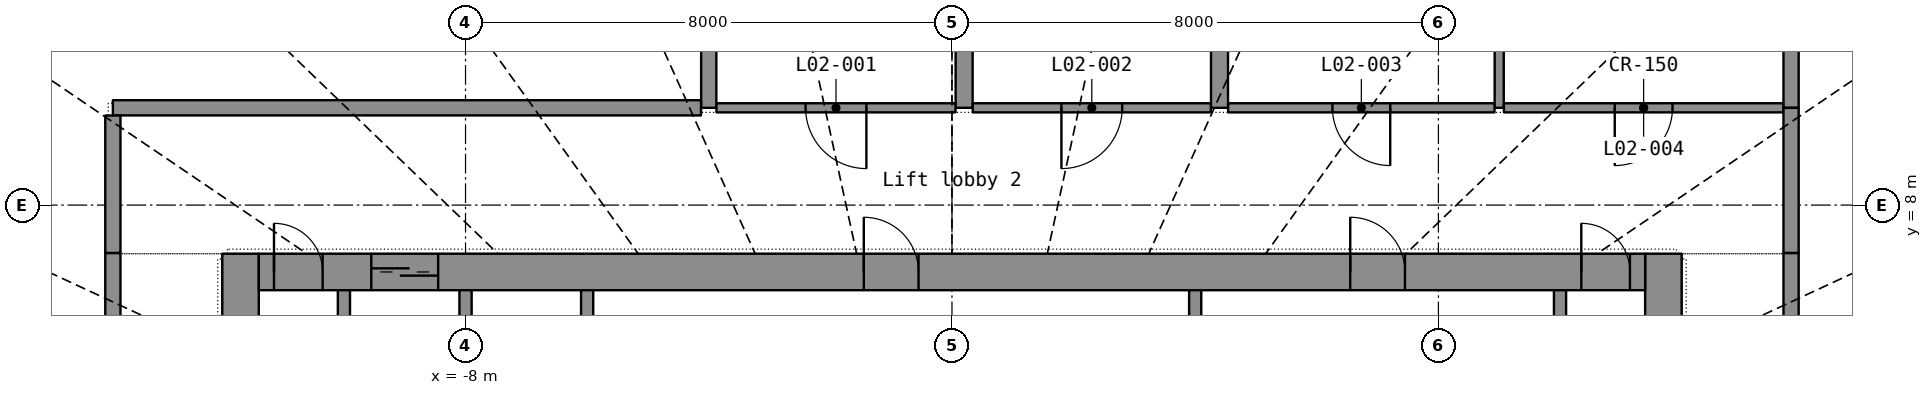
"""IFC4 building model, lengths in metres.
Left out: names, types, materials, properties, quantities, classifications, styles, units other than length and angle.
Written with IfcOpenShell. Run it as: python <this file> out.ifc"""

import sys

from ifc_helpers import new_model, si_unit, direction, frame, frame_2d, origin, place, context, subcontext, project, spatial, rectangle, extrude, element, fill, save


model = new_model("IFC4")
c1 = context("Model", 3, precision=1e-05, world=origin(), true_north=direction((0.0, 1.0)))
c2 = subcontext(c1, "Body", "Model", "MODEL_VIEW")
j1 = project(units=[si_unit("LENGTHUNIT", "METRE"), si_unit("PLANEANGLEUNIT", "RADIAN")], contexts=[c1])
p1 = place(None, origin())
s1 = spatial("IfcSite", under=j1, at=p1, CompositionType="ELEMENT")
p2 = place(p1, origin())
s2 = spatial("IfcBuilding", under=s1, at=p2, CompositionType="ELEMENT")
p3 = place(p2, frame((0.0, 0.0, 13.5)))
s3 = spatial("IfcBuildingStorey", under=s2, at=p3, CompositionType="ELEMENT", Elevation=13.5)
p4 = place(p3, frame((-11.7, -7.2, 0.0), z_axis=(0.0, 0.0, 1.0), x_axis=(0.0, 1.0, 0.0)))
e1 = element("IfcWall", 1, at=p4, inside=s3, PredefinedType="SHEAR", context=c2, shape_type="SweptSolid", body=[
    extrude(rectangle(XDim=14.4, YDim=0.6, at=frame_2d((7.2, 0.0))), origin(), (0.0, 0.0, 1.0), 6.1),
])
p5 = place(p4, frame((6.5, 0.0, 0.0)))
e2 = element("IfcOpeningElement", 2, at=p5, cuts=e1, PredefinedType="OPENING", context=c2, shape_type="SweptSolid", body=[
    extrude(rectangle(XDim=1.4, YDim=2.2, at=frame_2d((0.7, 1.1))), frame((0.0, 0.31, 0.0), z_axis=(0.0, -1.0, 0.0), x_axis=(1.0, 0.0, 0.0)), (0.0, 0.0, 1.0), 0.62),
])
p6 = place(p3, frame((11.7, -7.2, 0.0), z_axis=(0.0, 0.0, 1.0), x_axis=(0.0, 1.0, 0.0)))
e3 = element("IfcWall", 3, at=p6, inside=s3, PredefinedType="SHEAR", context=c2, shape_type="SweptSolid", body=[
    extrude(rectangle(XDim=14.4, YDim=0.6, at=frame_2d((7.2, 0.0))), origin(), (0.0, 0.0, 1.0), 6.1),
])
p7 = place(p6, frame((6.5, 0.0, 0.0)))
e4 = element("IfcOpeningElement", 4, at=p7, cuts=e3, PredefinedType="OPENING", context=c2, shape_type="SweptSolid", body=[
    extrude(rectangle(XDim=1.4, YDim=2.2, at=frame_2d((0.7, 1.1))), frame((0.0, 0.31, 0.0), z_axis=(0.0, -1.0, 0.0), x_axis=(1.0, 0.0, 0.0)), (0.0, 0.0, 1.0), 0.62),
])
p8 = place(p3, frame((-11.4, 6.9, 0.0), z_axis=(0.0, 0.0, 1.0), x_axis=(1.0, 0.0, 0.0)))
e5 = element("IfcWall", 5, at=p8, inside=s3, PredefinedType="SHEAR", context=c2, shape_type="SweptSolid", body=[
    extrude(rectangle(XDim=22.8, YDim=0.6, at=frame_2d((11.4, 0.0))), origin(), (0.0, 0.0, 1.0), 6.1),
])
p9 = place(p8, frame((1.85, 0.0, 0.0)))
e6 = element("IfcOpeningElement", 6, at=p9, cuts=e5, PredefinedType="OPENING", context=c2, shape_type="SweptSolid", body=[
    extrude(rectangle(XDim=1.1, YDim=2.2, at=frame_2d((0.55, 1.1))), frame((0.0, 0.31, 0.0), z_axis=(0.0, -1.0, 0.0), x_axis=(1.0, 0.0, 0.0)), (0.0, 0.0, 1.0), 0.62),
])
p10 = place(p8, frame((9.95, 0.0, 0.0)))
e7 = element("IfcOpeningElement", 7, at=p10, cuts=e5, PredefinedType="OPENING", context=c2, shape_type="SweptSolid", body=[
    extrude(rectangle(XDim=0.9, YDim=2.1, at=frame_2d((0.45, 1.05))), frame((0.0, 0.31, 0.0), z_axis=(0.0, -1.0, 0.0), x_axis=(1.0, 0.0, 0.0)), (0.0, 0.0, 1.0), 0.62),
])
p11 = place(p8, frame((17.95, 0.0, 0.0)))
e8 = element("IfcOpeningElement", 8, at=p11, cuts=e5, PredefinedType="OPENING", context=c2, shape_type="SweptSolid", body=[
    extrude(rectangle(XDim=0.9, YDim=2.1, at=frame_2d((0.45, 1.05))), frame((0.0, 0.31, 0.0), z_axis=(0.0, -1.0, 0.0), x_axis=(1.0, 0.0, 0.0)), (0.0, 0.0, 1.0), 0.62),
])
p12 = place(p8, frame((0.25, 0.0, 0.0)))
e9 = element("IfcOpeningElement", 9, at=p12, cuts=e5, PredefinedType="OPENING", context=c2, shape_type="SweptSolid", body=[
    extrude(rectangle(XDim=0.8, YDim=2.05, at=frame_2d((0.4, 1.025))), frame((0.0, 0.31, 0.0), z_axis=(0.0, -1.0, 0.0), x_axis=(1.0, 0.0, 0.0)), (0.0, 0.0, 1.0), 0.62),
])
p13 = place(p8, frame((21.75, 0.0, 0.0)))
e10 = element("IfcOpeningElement", 10, at=p13, cuts=e5, PredefinedType="OPENING", context=c2, shape_type="SweptSolid", body=[
    extrude(rectangle(XDim=0.8, YDim=2.05, at=frame_2d((0.4, 1.025))), frame((0.0, 0.31, 0.0), z_axis=(0.0, -1.0, 0.0), x_axis=(1.0, 0.0, 0.0)), (0.0, 0.0, 1.0), 0.62),
])
for number, where, z_axis, x_axis in (
    (11, (-10.0, 3.9, 0.0), (0.0, 0.0, 1.0), (0.0, 1.0, 0.0)),
    (12, (-8.0, 3.9, 0.0), (0.0, 0.0, 1.0), (0.0, 1.0, 0.0)),
    (13, (-6.0, 3.9, 0.0), (0.0, 0.0, 1.0), (0.0, 1.0, 0.0)),
    (14, (10.0, 3.9, 0.0), (0.0, 0.0, 1.0), (0.0, 1.0, 0.0)),
):
    element("IfcWall", number, at=place(p3, frame(where, z_axis=z_axis, x_axis=x_axis)), inside=s3, PredefinedType="SHEAR", context=c2, shape_type="SweptSolid", body=[
        extrude(rectangle(XDim=2.7, YDim=0.2, at=frame_2d((1.35, 0.0))), origin(), (0.0, 0.0, 1.0), 6.1),
    ])
p14 = place(p3, frame((4.0, 3.9, 0.0), z_axis=(0.0, 0.0, 1.0), x_axis=(0.0, 1.0, 0.0)))
e15 = element("IfcWall", 15, at=p14, inside=s3, PredefinedType="PARTITIONING", context=c2, shape_type="SweptSolid", body=[
    extrude(rectangle(XDim=2.7, YDim=0.2, at=frame_2d((1.35, 0.0))), origin(), (0.0, 0.0, 1.0), 6.1),
])
p15 = place(p3, frame((0.2, 9.6, 0.0), z_axis=(0.0, 0.0, 1.0), x_axis=(0.0, 1.0, 0.0)))
e16 = element("IfcWall", 16, at=p15, inside=s3, PredefinedType="PARTITIONING", context=c2, shape_type="SweptSolid", body=[
    extrude(rectangle(XDim=14.194, YDim=0.28, at=frame_2d((7.097, 0.0))), origin(), (0.0, 0.0, 1.0), 5.1),
])
p16 = place(p15, frame((5.897, 0.0, 1.0)))
e17 = element("IfcOpeningElement", 17, at=p16, cuts=e16, PredefinedType="OPENING", context=c2, shape_type="SweptSolid", body=[
    extrude(rectangle(XDim=2.4, YDim=1.2, at=frame_2d((1.2, 0.6))), frame((0.0, 0.15, 0.0), z_axis=(0.0, -1.0, 0.0), x_axis=(1.0, 0.0, 0.0)), (0.0, 0.0, 1.0), 0.3),
])
p17 = place(p3, frame((-4.0, 9.6, 0.0), z_axis=(0.0, 0.0, 1.0), x_axis=(0.0, 1.0, 0.0)))
e18 = element("IfcWall", 18, at=p17, inside=s3, PredefinedType="PARTITIONING", context=c2, shape_type="SweptSolid", body=[
    extrude(rectangle(XDim=13.846, YDim=0.25, at=frame_2d((6.923, 0.0))), origin(), (0.0, 0.0, 1.0), 5.1),
])
p18 = place(p17, frame((5.723, 0.0, 1.0)))
e19 = element("IfcOpeningElement", 19, at=p18, cuts=e18, PredefinedType="OPENING", context=c2, shape_type="SweptSolid", body=[
    extrude(rectangle(XDim=2.4, YDim=1.2, at=frame_2d((1.2, 0.6))), frame((0.0, 0.135, 0.0), z_axis=(0.0, -1.0, 0.0), x_axis=(1.0, 0.0, 0.0)), (0.0, 0.0, 1.0), 0.27),
])
p19 = place(p3, frame((4.4, 9.6, 0.0), z_axis=(0.0, 0.0, 1.0), x_axis=(0.0, 1.0, 0.0)))
e20 = element("IfcWall", 20, at=p19, inside=s3, PredefinedType="PARTITIONING", context=c2, shape_type="SweptSolid", body=[
    extrude(rectangle(XDim=13.803, YDim=0.28, at=frame_2d((6.902, 0.0))), origin(), (0.0, 0.0, 1.0), 5.1),
])
p20 = place(p19, frame((5.702, 0.0, 1.0)))
e21 = element("IfcOpeningElement", 21, at=p20, cuts=e20, PredefinedType="OPENING", context=c2, shape_type="SweptSolid", body=[
    extrude(rectangle(XDim=2.4, YDim=1.2, at=frame_2d((1.2, 0.6))), frame((0.0, 0.15, 0.0), z_axis=(0.0, -1.0, 0.0), x_axis=(1.0, 0.0, 0.0)), (0.0, 0.0, 1.0), 0.3),
])
p21 = place(p3, frame((9.0, 9.6, 0.0), z_axis=(0.0, 0.0, 1.0), x_axis=(0.0, 1.0, 0.0)))
e22 = element("IfcWall", 22, at=p21, inside=s3, PredefinedType="PARTITIONING", context=c2, shape_type="SweptSolid", body=[
    extrude(rectangle(XDim=12.906, YDim=0.15, at=frame_2d((6.453, 0.0))), origin(), (0.0, 0.0, 1.0), 5.1),
])
p22 = place(p3, frame((13.8, 20.878, 0.0), z_axis=(0.0, 0.0, 1.0), x_axis=(0.0, -1.0, 0.0)))
e23 = element("IfcWall", 23, at=p22, inside=s3, PredefinedType="PARTITIONING", context=c2, shape_type="SweptSolid", body=[
    extrude(rectangle(XDim=11.278, YDim=0.25, at=frame_2d((5.639, 0.0))), origin(), (0.0, 0.0, 1.0), 5.1),
])
p23 = place(p3, frame((-4.127, 9.6, 0.0), z_axis=(0.0, 0.0, 1.0), x_axis=(-1.0, 0.0, 0.0)))
e24 = element("IfcWall", 24, at=p23, inside=s3, PredefinedType="PARTITIONING", context=c2, shape_type="SweptSolid", body=[
    extrude(rectangle(XDim=9.673, YDim=0.25, at=frame_2d((4.836, 0.0))), origin(), (0.0, 0.0, 1.0), 5.1),
])
p24 = place(p3, frame((13.673, 9.6, 0.0), z_axis=(0.0, 0.0, 1.0), x_axis=(-1.0, 0.0, 0.0)))
e25 = element("IfcWall", 25, at=p24, inside=s3, PredefinedType="PARTITIONING", context=c2, shape_type="SweptSolid", body=[
    extrude(rectangle(XDim=4.596, YDim=0.15, at=frame_2d((2.298, 0.0))), origin(), (0.0, 0.0, 1.0), 5.1),
])
p25 = place(p24, frame((1.823, 0.0, 0.0)))
e26 = element("IfcOpeningElement", 26, at=p25, cuts=e25, PredefinedType="OPENING", context=c2, shape_type="SweptSolid", body=[
    extrude(rectangle(XDim=0.95, YDim=2.15, at=frame_2d((0.475, 1.075))), frame((0.0, 0.085, 0.0), z_axis=(0.0, -1.0, 0.0), x_axis=(1.0, 0.0, 0.0)), (0.0, 0.0, 1.0), 0.17),
])
p26 = place(p3, frame((8.923, 9.6, 0.0), z_axis=(0.0, 0.0, 1.0), x_axis=(-1.0, 0.0, 0.0)))
e27 = element("IfcWall", 27, at=p26, inside=s3, PredefinedType="PARTITIONING", context=c2, shape_type="SweptSolid", body=[
    extrude(rectangle(XDim=4.381, YDim=0.15, at=frame_2d((2.19, 0.0))), origin(), (0.0, 0.0, 1.0), 5.1),
])
p27 = place(p26, frame((1.716, 0.0, 0.0)))
e28 = element("IfcOpeningElement", 28, at=p27, cuts=e27, PredefinedType="OPENING", context=c2, shape_type="SweptSolid", body=[
    extrude(rectangle(XDim=0.95, YDim=2.15, at=frame_2d((0.475, 1.075))), frame((0.0, 0.085, 0.0), z_axis=(0.0, -1.0, 0.0), x_axis=(1.0, 0.0, 0.0)), (0.0, 0.0, 1.0), 0.17),
])
for number, where, z_axis, x_axis in (
    (29, (-13.8, 7.212, 0.0), (0.0, 0.0, 1.0), (0.0, -1.0, 0.0)),
    (30, (13.8, 3.0, 0.0), (0.0, 0.0, 1.0), (0.0, 1.0, 0.0)),
):
    element("IfcWall", number, at=place(p3, frame(where, z_axis=z_axis, x_axis=x_axis)), inside=s3, PredefinedType="PARTITIONING", context=c2, shape_type="SweptSolid", body=[
        extrude(rectangle(XDim=4.212, YDim=0.25, at=frame_2d((2.106, 0.0))), origin(), (0.0, 0.0, 1.0), 5.1),
    ])
p28 = place(p3, frame((0.058, 9.6, 0.0), z_axis=(0.0, 0.0, 1.0), x_axis=(-1.0, 0.0, 0.0)))
e31 = element("IfcWall", 31, at=p28, inside=s3, PredefinedType="PARTITIONING", context=c2, shape_type="SweptSolid", body=[
    extrude(rectangle(XDim=3.931, YDim=0.15, at=frame_2d((1.966, 0.0))), origin(), (0.0, 0.0, 1.0), 5.1),
])
p29 = place(p28, frame((1.466, 0.0, 0.0)))
e32 = element("IfcOpeningElement", 32, at=p29, cuts=e31, PredefinedType="OPENING", context=c2, shape_type="SweptSolid", body=[
    extrude(rectangle(XDim=1.0, YDim=2.2, at=frame_2d((0.5, 1.1))), frame((0.0, 0.085, 0.0), z_axis=(0.0, -1.0, 0.0), x_axis=(1.0, 0.0, 0.0)), (0.0, 0.0, 1.0), 0.17),
])
p30 = place(p3, frame((4.258, 9.6, 0.0), z_axis=(0.0, 0.0, 1.0), x_axis=(-1.0, 0.0, 0.0)))
e33 = element("IfcWall", 33, at=p30, inside=s3, PredefinedType="PARTITIONING", context=c2, shape_type="SweptSolid", body=[
    extrude(rectangle(XDim=3.916, YDim=0.15, at=frame_2d((1.958, 0.0))), origin(), (0.0, 0.0, 1.0), 5.1),
])
p31 = place(p30, frame((1.458, 0.0, 0.0)))
e34 = element("IfcOpeningElement", 34, at=p31, cuts=e33, PredefinedType="OPENING", context=c2, shape_type="SweptSolid", body=[
    extrude(rectangle(XDim=1.0, YDim=2.2, at=frame_2d((0.5, 1.1))), frame((0.0, 0.085, 0.0), z_axis=(0.0, -1.0, 0.0), x_axis=(1.0, 0.0, 0.0)), (0.0, 0.0, 1.0), 0.17),
])
p32 = place(p3, frame((13.8, 7.213, 0.0), z_axis=(0.0, 0.0, 1.0), x_axis=(0.0, 1.0, 0.0)))
e35 = element("IfcWall", 35, at=p32, inside=s3, PredefinedType="PARTITIONING", context=c2, shape_type="SweptSolid", body=[
    extrude(rectangle(XDim=2.386, YDim=0.25, at=frame_2d((1.193, 0.0))), origin(), (0.0, 0.0, 1.0), 5.1),
])
p33 = place(p3, frame((-13.8, 9.473, 0.0), z_axis=(0.0, 0.0, 1.0), x_axis=(0.0, -1.0, 0.0)))
e36 = element("IfcWall", 36, at=p33, inside=s3, PredefinedType="PARTITIONING", context=c2, shape_type="SweptSolid", body=[
    extrude(rectangle(XDim=2.26, YDim=0.25, at=frame_2d((1.13, 0.0))), origin(), (0.0, 0.0, 1.0), 5.1),
])
p34 = place(p9, origin())
e37 = element("IfcDoor", 37, at=p34, inside=s3, OperationType="DOUBLE_DOOR_SLIDING", PredefinedType="DOOR", context=c2, shape_type="SweptSolid", body=[
    extrude(rectangle(XDim=1.1, YDim=2.2, at=frame_2d((0.55, 1.1))), frame((0.0, 0.025, 0.0), z_axis=(0.0, -1.0, 0.0), x_axis=(1.0, 0.0, 0.0)), (0.0, 0.0, 1.0), 0.05),
])
fill(e6, e37)
p35 = place(p10, origin())
e38 = element("IfcDoor", 38, at=p35, inside=s3, OperationType="SINGLE_SWING_LEFT", PredefinedType="DOOR", context=c2, shape_type="SweptSolid", body=[
    extrude(rectangle(XDim=0.9, YDim=2.1, at=frame_2d((0.45, 1.05))), frame((0.0, 0.025, 0.0), z_axis=(0.0, -1.0, 0.0), x_axis=(1.0, 0.0, 0.0)), (0.0, 0.0, 1.0), 0.05),
])
fill(e7, e38)
p36 = place(p11, origin())
e39 = element("IfcDoor", 39, at=p36, inside=s3, OperationType="SINGLE_SWING_LEFT", PredefinedType="DOOR", context=c2, shape_type="SweptSolid", body=[
    extrude(rectangle(XDim=0.9, YDim=2.1, at=frame_2d((0.45, 1.05))), frame((0.0, 0.025, 0.0), z_axis=(0.0, -1.0, 0.0), x_axis=(1.0, 0.0, 0.0)), (0.0, 0.0, 1.0), 0.05),
])
fill(e8, e39)
p37 = place(p12, origin())
e40 = element("IfcDoor", 40, at=p37, inside=s3, OperationType="SINGLE_SWING_LEFT", PredefinedType="DOOR", context=c2, shape_type="SweptSolid", body=[
    extrude(rectangle(XDim=0.8, YDim=2.05, at=frame_2d((0.4, 1.025))), frame((0.0, 0.025, 0.0), z_axis=(0.0, -1.0, 0.0), x_axis=(1.0, 0.0, 0.0)), (0.0, 0.0, 1.0), 0.05),
])
fill(e9, e40)
p38 = place(p13, origin())
e41 = element("IfcDoor", 41, at=p38, inside=s3, OperationType="SINGLE_SWING_LEFT", PredefinedType="DOOR", context=c2, shape_type="SweptSolid", body=[
    extrude(rectangle(XDim=0.8, YDim=2.05, at=frame_2d((0.4, 1.025))), frame((0.0, 0.025, 0.0), z_axis=(0.0, -1.0, 0.0), x_axis=(1.0, 0.0, 0.0)), (0.0, 0.0, 1.0), 0.05),
])
fill(e10, e41)
p39 = place(p29, origin())
e42 = element("IfcDoor", 42, at=p39, inside=s3, OperationType="SINGLE_SWING_LEFT", PredefinedType="DOOR", context=c2, shape_type="SweptSolid", body=[
    extrude(rectangle(XDim=1.0, YDim=2.2, at=frame_2d((0.5, 1.1))), frame((0.0, 0.025, 0.0), z_axis=(0.0, -1.0, 0.0), x_axis=(1.0, 0.0, 0.0)), (0.0, 0.0, 1.0), 0.05),
])
fill(e32, e42)
p40 = place(p31, origin())
e43 = element("IfcDoor", 43, at=p40, inside=s3, OperationType="SINGLE_SWING_RIGHT", PredefinedType="DOOR", context=c2, shape_type="SweptSolid", body=[
    extrude(rectangle(XDim=1.0, YDim=2.2, at=frame_2d((0.5, 1.1))), frame((0.0, 0.025, 0.0), z_axis=(0.0, -1.0, 0.0), x_axis=(1.0, 0.0, 0.0)), (0.0, 0.0, 1.0), 0.05),
])
fill(e34, e43)
p41 = place(p27, origin())
e44 = element("IfcDoor", 44, at=p41, inside=s3, OperationType="SINGLE_SWING_LEFT", PredefinedType="DOOR", context=c2, shape_type="SweptSolid", body=[
    extrude(rectangle(XDim=0.95, YDim=2.15, at=frame_2d((0.475, 1.075))), frame((0.0, 0.025, 0.0), z_axis=(0.0, -1.0, 0.0), x_axis=(1.0, 0.0, 0.0)), (0.0, 0.0, 1.0), 0.05),
])
fill(e28, e44)
p42 = place(p25, origin())
e45 = element("IfcDoor", 45, at=p42, inside=s3, OperationType="SINGLE_SWING_RIGHT", PredefinedType="DOOR", context=c2, shape_type="SweptSolid", body=[
    extrude(rectangle(XDim=0.95, YDim=2.15, at=frame_2d((0.475, 1.075))), frame((0.0, 0.025, 0.0), z_axis=(0.0, -1.0, 0.0), x_axis=(1.0, 0.0, 0.0)), (0.0, 0.0, 1.0), 0.05),
])
fill(e26, e45)
save(model, sys.argv[1])
